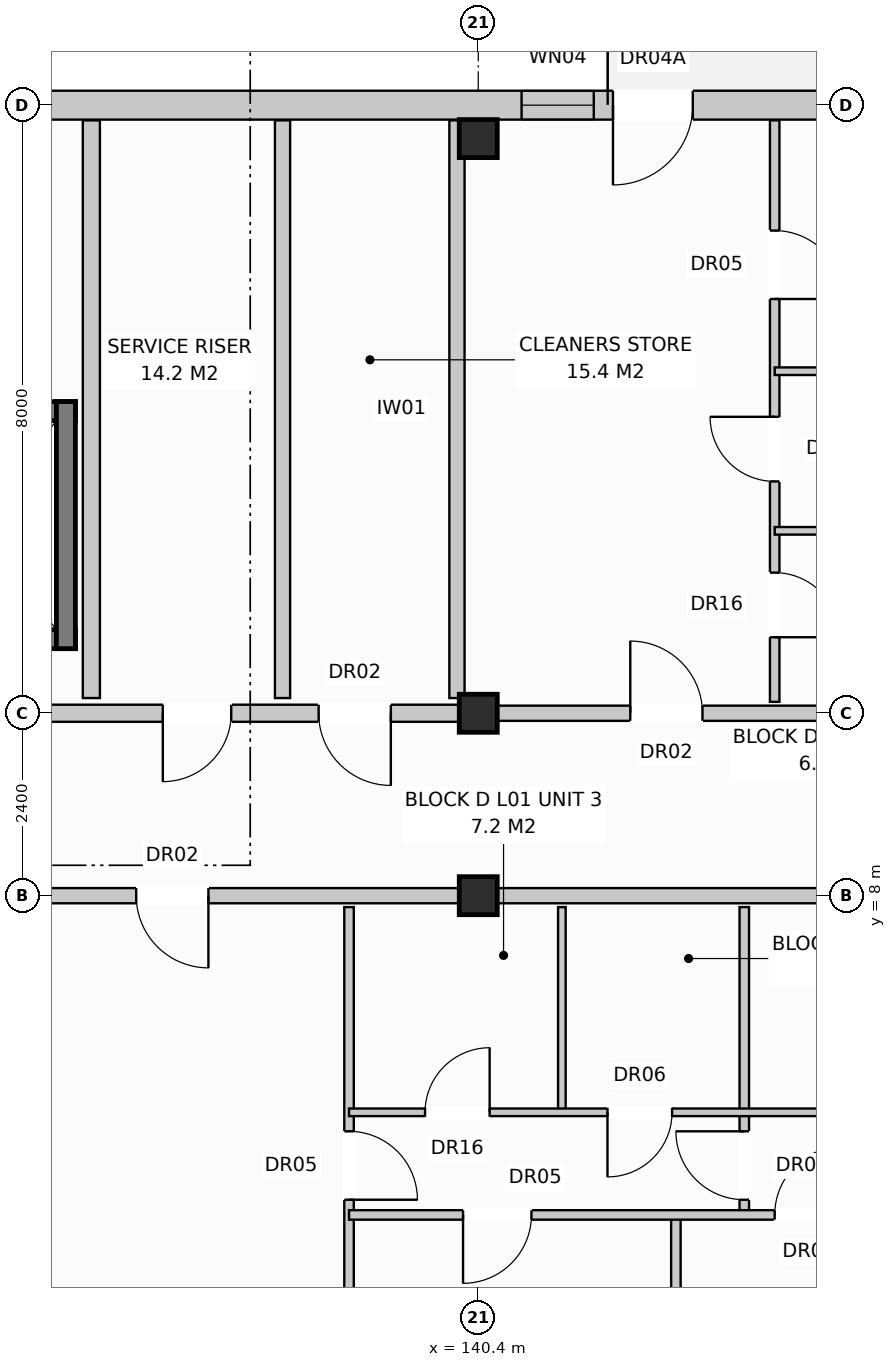
"""IFC4 building model, lengths in metres.
Left out: names, types, materials, properties, quantities, classifications, styles, units other than length and angle.
Written with IfcOpenShell. Run it as: python <this file> out.ifc"""

import sys

from ifc_helpers import new_model, si_unit, direction, frame, frame_2d, origin, origin_with_axes, origin_2d, place, context, subcontext, project, spatial, rectangle, extrude, element, fill, save


model = new_model("IFC4")
c1 = context("Model", 3, precision=1e-05, world=origin(), true_north=direction((0.0, 1.0)))
c2 = subcontext(c1, "Body", "Model", "MODEL_VIEW")
j1 = project(units=[si_unit("LENGTHUNIT", "METRE"), si_unit("PLANEANGLEUNIT", "RADIAN")], contexts=[c1])
p1 = place(None, origin())
s1 = spatial("IfcSite", under=j1, at=p1, CompositionType="ELEMENT")
p2 = place(p1, origin())
s2 = spatial("IfcBuilding", under=s1, at=p2, CompositionType="ELEMENT")
p3 = place(p2, frame((0.0, 0.0, 4.4)))
s3 = spatial("IfcBuildingStorey", under=s2, at=p3, CompositionType="ELEMENT", Elevation=4.4)
for number, where, z_axis, x_axis in (
    (1, (140.4, 8.0, 0.0), (0.0, 0.0, 1.0), (1.0, 0.0, 0.0)),
    (2, (140.4, 10.4, 0.0), (0.0, 0.0, 1.0), (1.0, 0.0, 0.0)),
    (3, (140.4, 17.96, 0.0), (0.0, 0.0, 1.0), (1.0, 0.0, 0.0)),
):
    element("IfcColumn", number, at=place(p3, frame(where, z_axis=z_axis, x_axis=x_axis)), inside=s3, PredefinedType="COLUMN", context=c2, shape_type="SweptSolid", body=[
        extrude(rectangle(XDim=0.5, YDim=0.5, at=origin_2d()), origin(), (0.0, 0.0, 1.0), 3.6),
    ])
p4 = place(p3, frame((130.25, 18.4, 0.0), z_axis=(0.0, 0.0, 1.0), x_axis=(1.0, 0.0, 0.0)))
e4 = element("IfcWall", 4, at=p4, inside=s3, PredefinedType="STANDARD", context=c2, shape_type="SweptSolid", body=[
    extrude(rectangle(XDim=17.5, YDim=0.38, at=frame_2d((8.75, 0.0))), origin(), (0.0, 0.0, 1.0), 3.33),
])
p5 = place(p4, frame((11.923, 0.0, 0.0)))
e5 = element("IfcOpeningElement", 5, at=p5, cuts=e4, PredefinedType="OPENING", context=c2, shape_type="SweptSolid", body=[
    extrude(rectangle(XDim=1.05, YDim=2.12, at=frame_2d((0.525, 1.06))), frame((0.0, 0.202, 0.0), z_axis=(0.0, -1.0, 0.0), x_axis=(1.0, 0.0, 0.0)), (0.0, 0.0, 1.0), 0.404),
])
p6 = place(p4, frame((10.72, 0.0, 0.9)))
e6 = element("IfcOpeningElement", 6, at=p6, cuts=e4, PredefinedType="OPENING", context=c2, shape_type="SweptSolid", body=[
    extrude(rectangle(XDim=0.95, YDim=1.55, at=frame_2d((0.475, 0.775))), frame((0.0, 0.202, 0.0), z_axis=(0.0, -1.0, 0.0), x_axis=(1.0, 0.0, 0.0)), (0.0, 0.0, 1.0), 0.404),
])
p7 = place(p4, frame((14.62, 0.0, 0.8)))
e7 = element("IfcOpeningElement", 7, at=p7, cuts=e4, PredefinedType="OPENING", context=c2, shape_type="SweptSolid", body=[
    extrude(rectangle(XDim=1.8, YDim=1.7, at=frame_2d((0.9, 0.85))), frame((0.0, 0.202, 0.0), z_axis=(0.0, -1.0, 0.0), x_axis=(1.0, 0.0, 0.0)), (0.0, 0.0, 1.0), 0.404),
])
p8 = place(p3, frame((132.5, 14.375, 0.0), z_axis=(0.0, 0.0, 1.0), x_axis=(1.0, 0.0, 0.0)))
e8 = element("IfcWall", 8, at=p8, inside=s3, PredefinedType="SHEAR", context=c2, shape_type="SweptSolid", body=[
    extrude(rectangle(XDim=2.6, YDim=0.25, at=frame_2d((1.3, 0.0))), origin(), (0.0, 0.0, 1.0), 3.33),
])
p9 = place(p8, frame((0.875, 0.0, 0.0)))
e9 = element("IfcOpeningElement", 9, at=p9, cuts=e8, PredefinedType="OPENING", context=c2, shape_type="SweptSolid", body=[
    extrude(rectangle(XDim=1.1, YDim=2.1, at=frame_2d((0.55, 1.05))), frame((0.0, 0.137, 0.0), z_axis=(0.0, -1.0, 0.0), x_axis=(1.0, 0.0, 0.0)), (0.0, 0.0, 1.0), 0.274),
])
p10 = place(p3, frame((132.5, 11.375, 0.0), z_axis=(0.0, 0.0, 1.0), x_axis=(1.0, 0.0, 0.0)))
e10 = element("IfcWall", 10, at=p10, inside=s3, PredefinedType="SHEAR", context=c2, shape_type="SweptSolid", body=[
    extrude(rectangle(XDim=2.6, YDim=0.25, at=frame_2d((1.3, 0.0))), origin(), (0.0, 0.0, 1.0), 3.33),
])
p11 = place(p3, frame((134.975, 11.25, 0.0), z_axis=(0.0, 0.0, 1.0), x_axis=(0.0, 1.0, 0.0)))
e11 = element("IfcWall", 11, at=p11, inside=s3, PredefinedType="SHEAR", context=c2, shape_type="SweptSolid", body=[
    extrude(rectangle(XDim=3.25, YDim=0.25, at=frame_2d((1.625, 0.0))), origin(), (0.0, 0.0, 1.0), 3.33),
])
p12 = place(p3, frame((135.31, 10.6, 0.0), z_axis=(0.0, 0.0, 1.0), x_axis=(0.0, 1.0, 0.0)))
e12 = element("IfcWall", 12, at=p12, inside=s3, PredefinedType="PARTITIONING", context=c2, shape_type="SweptSolid", body=[
    extrude(rectangle(XDim=7.6, YDim=0.225, at=frame_2d((3.8, 0.0))), origin(), (0.0, 0.0, 1.0), 2.99),
])
for number, where, z_axis, x_axis in (
    (13, (137.825, 10.6, 0.0), (0.0, 0.0, 1.0), (0.0, 1.0, 0.0)),
    (14, (140.12, 10.6, 0.0), (0.0, 0.0, 1.0), (0.0, 1.0, 0.0)),
):
    element("IfcWall", number, at=place(p3, frame(where, z_axis=z_axis, x_axis=x_axis)), inside=s3, PredefinedType="PARTITIONING", context=c2, shape_type="SweptSolid", body=[
        extrude(rectangle(XDim=7.6, YDim=0.2, at=frame_2d((3.8, 0.0))), origin(), (0.0, 0.0, 1.0), 3.33),
    ])
p13 = place(p3, frame((130.4, 10.4, 0.0), z_axis=(0.0, 0.0, 1.0), x_axis=(1.0, 0.0, 0.0)))
e15 = element("IfcWall", 15, at=p13, inside=s3, PredefinedType="PARTITIONING", context=c2, shape_type="SweptSolid", body=[
    extrude(rectangle(XDim=10.0, YDim=0.225, at=frame_2d((5.0, 0.0))), origin(), (0.0, 0.0, 1.0), 2.77),
])
p14 = place(p13, frame((0.475, 0.0, 0.0)))
e16 = element("IfcOpeningElement", 16, at=p14, cuts=e15, PredefinedType="OPENING", context=c2, shape_type="SweptSolid", body=[
    extrude(rectangle(XDim=1.1, YDim=2.15, at=frame_2d((0.55, 1.075))), frame((0.0, 0.125, 0.0), z_axis=(0.0, -1.0, 0.0), x_axis=(1.0, 0.0, 0.0)), (0.0, 0.0, 1.0), 0.249),
])
p15 = place(p13, frame((5.85, 0.0, 0.0)))
e17 = element("IfcOpeningElement", 17, at=p15, cuts=e15, PredefinedType="OPENING", context=c2, shape_type="SweptSolid", body=[
    extrude(rectangle(XDim=0.9, YDim=2.1, at=frame_2d((0.45, 1.05))), frame((0.0, 0.125, 0.0), z_axis=(0.0, -1.0, 0.0), x_axis=(1.0, 0.0, 0.0)), (0.0, 0.0, 1.0), 0.249),
])
p16 = place(p13, frame((7.9, 0.0, 0.0)))
e18 = element("IfcOpeningElement", 18, at=p16, cuts=e15, PredefinedType="OPENING", context=c2, shape_type="SweptSolid", body=[
    extrude(rectangle(XDim=0.95, YDim=2.15, at=frame_2d((0.475, 1.075))), frame((0.0, 0.125, 0.0), z_axis=(0.0, -1.0, 0.0), x_axis=(1.0, 0.0, 0.0)), (0.0, 0.0, 1.0), 0.249),
])
p17 = place(p3, frame((133.5, 8.0, 0.0), z_axis=(0.0, 0.0, 1.0), x_axis=(1.0, 0.0, 0.0)))
e19 = element("IfcWall", 19, at=p17, inside=s3, PredefinedType="PARTITIONING", context=c2, shape_type="SweptSolid", body=[
    extrude(rectangle(XDim=13.8, YDim=0.2, at=frame_2d((6.9, 0.0))), origin(), (0.0, 0.0, 1.0), 2.77),
])
p18 = place(p17, frame((2.4, 0.0, 0.0)))
e20 = element("IfcOpeningElement", 20, at=p18, cuts=e19, PredefinedType="OPENING", context=c2, shape_type="SweptSolid", body=[
    extrude(rectangle(XDim=0.95, YDim=2.15, at=frame_2d((0.475, 1.075))), frame((0.0, 0.112, 0.0), z_axis=(0.0, -1.0, 0.0), x_axis=(1.0, 0.0, 0.0)), (0.0, 0.0, 1.0), 0.224),
])
p19 = place(p3, frame((138.7, 7.85, 0.0), z_axis=(0.0, 0.0, 1.0), x_axis=(0.0, -1.0, 0.0)))
e21 = element("IfcWall", 21, at=p19, inside=s3, PredefinedType="PARTITIONING", context=c2, shape_type="SweptSolid", body=[
    extrude(rectangle(XDim=7.65, YDim=0.125, at=frame_2d((3.825, 0.0))), origin(), (0.0, 0.0, 1.0), 3.33),
])
p20 = place(p19, frame((2.95, 0.0, 0.0)))
e22 = element("IfcOpeningElement", 22, at=p20, cuts=e21, PredefinedType="OPENING", context=c2, shape_type="SweptSolid", body=[
    extrude(rectangle(XDim=0.9, YDim=2.1, at=frame_2d((0.45, 1.05))), frame((0.0, 0.074, 0.0), z_axis=(0.0, -1.0, 0.0), x_axis=(1.0, 0.0, 0.0)), (0.0, 0.0, 1.0), 0.149),
])
p21 = place(p3, frame((141.5, 7.85, 0.0), z_axis=(0.0, 0.0, 1.0), x_axis=(0.0, -1.0, 0.0)))
e23 = element("IfcWall", 23, at=p21, inside=s3, PredefinedType="PARTITIONING", context=c2, shape_type="SweptSolid", body=[
    extrude(rectangle(XDim=2.7, YDim=0.1, at=frame_2d((1.35, 0.0))), origin(), (0.0, 0.0, 1.0), 3.33),
])
p22 = place(p3, frame((143.9, 7.85, 0.0), z_axis=(0.0, 0.0, 1.0), x_axis=(0.0, -1.0, 0.0)))
e24 = element("IfcWall", 24, at=p22, inside=s3, PredefinedType="PARTITIONING", context=c2, shape_type="SweptSolid", body=[
    extrude(rectangle(XDim=4.05, YDim=0.125, at=frame_2d((2.025, 0.0))), origin(), (0.0, 0.0, 1.0), 3.33),
])
p23 = place(p22, frame((2.95, 0.0, 0.0)))
e25 = element("IfcOpeningElement", 25, at=p23, cuts=e24, PredefinedType="OPENING", context=c2, shape_type="SweptSolid", body=[
    extrude(rectangle(XDim=0.9, YDim=2.1, at=frame_2d((0.45, 1.05))), frame((0.0, 0.074, 0.0), z_axis=(0.0, -1.0, 0.0), x_axis=(1.0, 0.0, 0.0)), (0.0, 0.0, 1.0), 0.149),
])
p24 = place(p3, frame((143.0, 3.8, 0.0), z_axis=(0.0, 0.0, 1.0), x_axis=(0.0, -1.0, 0.0)))
e26 = element("IfcWall", 26, at=p24, inside=s3, PredefinedType="PARTITIONING", context=c2, shape_type="SweptSolid", body=[
    extrude(rectangle(XDim=3.6, YDim=0.125, at=frame_2d((1.8, 0.0))), origin(), (0.0, 0.0, 1.0), 2.99),
])
p25 = place(p3, frame((138.7, 5.15, 0.0), z_axis=(0.0, 0.0, 1.0), x_axis=(1.0, 0.0, 0.0)))
e27 = element("IfcWall", 27, at=p25, inside=s3, PredefinedType="PARTITIONING", context=c2, shape_type="SweptSolid", body=[
    extrude(rectangle(XDim=8.5, YDim=0.1, at=frame_2d((4.25, 0.0))), origin(), (0.0, 0.0, 1.0), 3.33),
])
p26 = place(p25, frame((1.0, 0.0, 0.0)))
e28 = element("IfcOpeningElement", 28, at=p26, cuts=e27, PredefinedType="OPENING", context=c2, shape_type="SweptSolid", body=[
    extrude(rectangle(XDim=0.85, YDim=2.1, at=frame_2d((0.425, 1.05))), frame((0.0, 0.062, 0.0), z_axis=(0.0, -1.0, 0.0), x_axis=(1.0, 0.0, 0.0)), (0.0, 0.0, 1.0), 0.124),
])
p27 = place(p25, frame((3.4, 0.0, 0.0)))
e29 = element("IfcOpeningElement", 29, at=p27, cuts=e27, PredefinedType="OPENING", context=c2, shape_type="SweptSolid", body=[
    extrude(rectangle(XDim=0.85, YDim=2.05, at=frame_2d((0.425, 1.025))), frame((0.0, 0.062, 0.0), z_axis=(0.0, -1.0, 0.0), x_axis=(1.0, 0.0, 0.0)), (0.0, 0.0, 1.0), 0.124),
])
p28 = place(p25, frame((6.2, 0.0, 0.0)))
e30 = element("IfcOpeningElement", 30, at=p28, cuts=e27, PredefinedType="OPENING", context=c2, shape_type="SweptSolid", body=[
    extrude(rectangle(XDim=0.85, YDim=2.05, at=frame_2d((0.425, 1.025))), frame((0.0, 0.062, 0.0), z_axis=(0.0, -1.0, 0.0), x_axis=(1.0, 0.0, 0.0)), (0.0, 0.0, 1.0), 0.124),
])
p29 = place(p3, frame((138.7, 3.8, 0.0), z_axis=(0.0, 0.0, 1.0), x_axis=(1.0, 0.0, 0.0)))
e31 = element("IfcWall", 31, at=p29, inside=s3, PredefinedType="PARTITIONING", context=c2, shape_type="SweptSolid", body=[
    extrude(rectangle(XDim=8.5, YDim=0.125, at=frame_2d((4.25, 0.0))), origin(), (0.0, 0.0, 1.0), 3.33),
])
p30 = place(p29, frame((1.5, 0.0, 0.0)))
e32 = element("IfcOpeningElement", 32, at=p30, cuts=e31, PredefinedType="OPENING", context=c2, shape_type="SweptSolid", body=[
    extrude(rectangle(XDim=0.9, YDim=2.1, at=frame_2d((0.45, 1.05))), frame((0.0, 0.074, 0.0), z_axis=(0.0, -1.0, 0.0), x_axis=(1.0, 0.0, 0.0)), (0.0, 0.0, 1.0), 0.149),
])
p31 = place(p29, frame((5.6, 0.0, 0.0)))
e33 = element("IfcOpeningElement", 33, at=p31, cuts=e31, PredefinedType="OPENING", context=c2, shape_type="SweptSolid", body=[
    extrude(rectangle(XDim=0.9, YDim=2.1, at=frame_2d((0.45, 1.05))), frame((0.0, 0.074, 0.0), z_axis=(0.0, -1.0, 0.0), x_axis=(1.0, 0.0, 0.0)), (0.0, 0.0, 1.0), 0.149),
])
p32 = place(p3, frame((140.4, 10.4, 0.0), z_axis=(0.0, 0.0, 1.0), x_axis=(1.0, 0.0, 0.0)))
e34 = element("IfcWall", 34, at=p32, inside=s3, PredefinedType="PARTITIONING", context=c2, shape_type="SweptSolid", body=[
    extrude(rectangle(XDim=6.9, YDim=0.2, at=frame_2d((3.45, 0.0))), origin(), (0.0, 0.0, 1.0), 2.77),
])
p33 = place(p32, frame((2.0, 0.0, 0.0)))
e35 = element("IfcOpeningElement", 35, at=p33, cuts=e34, PredefinedType="OPENING", context=c2, shape_type="SweptSolid", body=[
    extrude(rectangle(XDim=0.95, YDim=2.15, at=frame_2d((0.475, 1.075))), frame((0.0, 0.112, 0.0), z_axis=(0.0, -1.0, 0.0), x_axis=(1.0, 0.0, 0.0)), (0.0, 0.0, 1.0), 0.224),
])
p34 = place(p3, frame((144.3, 10.55, 0.0), z_axis=(0.0, 0.0, 1.0), x_axis=(0.0, 1.0, 0.0)))
e36 = element("IfcWall", 36, at=p34, inside=s3, PredefinedType="PARTITIONING", context=c2, shape_type="SweptSolid", body=[
    extrude(rectangle(XDim=7.65, YDim=0.125, at=frame_2d((3.825, 0.0))), origin(), (0.0, 0.0, 1.0), 3.33),
])
p35 = place(p34, frame((0.85, 0.0, 0.0)))
e37 = element("IfcOpeningElement", 37, at=p35, cuts=e36, PredefinedType="OPENING", context=c2, shape_type="SweptSolid", body=[
    extrude(rectangle(XDim=0.85, YDim=2.1, at=frame_2d((0.425, 1.05))), frame((0.0, 0.074, 0.0), z_axis=(0.0, -1.0, 0.0), x_axis=(1.0, 0.0, 0.0)), (0.0, 0.0, 1.0), 0.149),
])
p36 = place(p34, frame((2.9, 0.0, 0.0)))
e38 = element("IfcOpeningElement", 38, at=p36, cuts=e36, PredefinedType="OPENING", context=c2, shape_type="SweptSolid", body=[
    extrude(rectangle(XDim=0.85, YDim=2.05, at=frame_2d((0.425, 1.025))), frame((0.0, 0.074, 0.0), z_axis=(0.0, -1.0, 0.0), x_axis=(1.0, 0.0, 0.0)), (0.0, 0.0, 1.0), 0.149),
])
p37 = place(p34, frame((5.3, 0.0, 0.0)))
e39 = element("IfcOpeningElement", 39, at=p37, cuts=e36, PredefinedType="OPENING", context=c2, shape_type="SweptSolid", body=[
    extrude(rectangle(XDim=0.9, YDim=2.1, at=frame_2d((0.45, 1.05))), frame((0.0, 0.074, 0.0), z_axis=(0.0, -1.0, 0.0), x_axis=(1.0, 0.0, 0.0)), (0.0, 0.0, 1.0), 0.149),
])
for number, where, z_axis, x_axis in (
    (40, (144.3, 12.8, 0.0), (0.0, 0.0, 1.0), (1.0, 0.0, 0.0)),
    (41, (144.3, 14.9, 0.0), (0.0, 0.0, 1.0), (1.0, 0.0, 0.0)),
):
    element("IfcWall", number, at=place(p3, frame(where, z_axis=z_axis, x_axis=x_axis)), inside=s3, PredefinedType="PARTITIONING", context=c2, shape_type="SweptSolid", body=[
        extrude(rectangle(XDim=2.9, YDim=0.1, at=frame_2d((1.45, 0.0))), origin(), (0.0, 0.0, 1.0), 3.33),
    ])
p38 = place(p5, frame((1.05, 0.0, 0.0), z_axis=(0.0, 0.0, 1.0), x_axis=(-1.0, 0.0, 0.0)))
e42 = element("IfcDoor", 42, at=p38, inside=s3, OperationType="SINGLE_SWING_LEFT", PredefinedType="DOOR", context=c2, shape_type="SweptSolid", body=[
    extrude(rectangle(XDim=1.05, YDim=2.12, at=frame_2d((0.525, 1.06))), frame((0.0, 0.025, 0.0), z_axis=(0.0, -1.0, 0.0), x_axis=(1.0, 0.0, 0.0)), (0.0, 0.0, 1.0), 0.05),
])
fill(e5, e42)
p39 = place(p6, origin_with_axes())
e43 = element("IfcWindow", 43, at=p39, inside=s3, PartitioningType="SINGLE_PANEL", PredefinedType="WINDOW", context=c2, shape_type="SweptSolid", body=[
    extrude(rectangle(XDim=0.95, YDim=1.55, at=frame_2d((0.475, 0.775))), frame((0.0, 0.03, 0.0), z_axis=(0.0, -1.0, 0.0), x_axis=(1.0, 0.0, 0.0)), (0.0, 0.0, 1.0), 0.06),
])
fill(e6, e43)
p40 = place(p15, frame((0.9, 0.0, 0.0), z_axis=(0.0, 0.0, 1.0), x_axis=(-1.0, 0.0, 0.0)))
e44 = element("IfcDoor", 44, at=p40, inside=s3, OperationType="SINGLE_SWING_LEFT", PredefinedType="DOOR", context=c2, shape_type="SweptSolid", body=[
    extrude(rectangle(XDim=0.9, YDim=2.1, at=frame_2d((0.45, 1.05))), frame((0.0, 0.025, 0.0), z_axis=(0.0, -1.0, 0.0), x_axis=(1.0, 0.0, 0.0)), (0.0, 0.0, 1.0), 0.05),
])
fill(e17, e44)
p41 = place(p16, frame((0.95, 0.0, 0.0), z_axis=(0.0, 0.0, 1.0), x_axis=(-1.0, 0.0, 0.0)))
e45 = element("IfcDoor", 45, at=p41, inside=s3, OperationType="SINGLE_SWING_RIGHT", PredefinedType="DOOR", context=c2, shape_type="SweptSolid", body=[
    extrude(rectangle(XDim=0.95, YDim=2.15, at=frame_2d((0.475, 1.075))), frame((0.0, 0.025, 0.0), z_axis=(0.0, -1.0, 0.0), x_axis=(1.0, 0.0, 0.0)), (0.0, 0.0, 1.0), 0.05),
])
fill(e18, e45)
p42 = place(p18, frame((0.95, 0.0, 0.0), z_axis=(0.0, 0.0, 1.0), x_axis=(-1.0, 0.0, 0.0)))
e46 = element("IfcDoor", 46, at=p42, inside=s3, OperationType="SINGLE_SWING_RIGHT", PredefinedType="DOOR", context=c2, shape_type="SweptSolid", body=[
    extrude(rectangle(XDim=0.95, YDim=2.15, at=frame_2d((0.475, 1.075))), frame((0.0, 0.025, 0.0), z_axis=(0.0, -1.0, 0.0), x_axis=(1.0, 0.0, 0.0)), (0.0, 0.0, 1.0), 0.05),
])
fill(e20, e46)
p43 = place(p20, origin_with_axes())
e47 = element("IfcDoor", 47, at=p43, inside=s3, OperationType="SINGLE_SWING_RIGHT", PredefinedType="DOOR", context=c2, shape_type="SweptSolid", body=[
    extrude(rectangle(XDim=0.9, YDim=2.1, at=frame_2d((0.45, 1.05))), frame((0.0, 0.025, 0.0), z_axis=(0.0, -1.0, 0.0), x_axis=(1.0, 0.0, 0.0)), (0.0, 0.0, 1.0), 0.05),
])
fill(e22, e47)
p44 = place(p23, frame((0.9, 0.0, 0.0), z_axis=(0.0, 0.0, 1.0), x_axis=(-1.0, 0.0, 0.0)))
e48 = element("IfcDoor", 48, at=p44, inside=s3, OperationType="SINGLE_SWING_LEFT", PredefinedType="DOOR", context=c2, shape_type="SweptSolid", body=[
    extrude(rectangle(XDim=0.9, YDim=2.1, at=frame_2d((0.45, 1.05))), frame((0.0, 0.025, 0.0), z_axis=(0.0, -1.0, 0.0), x_axis=(1.0, 0.0, 0.0)), (0.0, 0.0, 1.0), 0.05),
])
fill(e25, e48)
p45 = place(p26, origin_with_axes())
e49 = element("IfcDoor", 49, at=p45, inside=s3, OperationType="SINGLE_SWING_RIGHT", PredefinedType="DOOR", context=c2, shape_type="SweptSolid", body=[
    extrude(rectangle(XDim=0.85, YDim=2.1, at=frame_2d((0.425, 1.05))), frame((0.0, 0.025, 0.0), z_axis=(0.0, -1.0, 0.0), x_axis=(1.0, 0.0, 0.0)), (0.0, 0.0, 1.0), 0.05),
])
fill(e28, e49)
p46 = place(p27, frame((0.85, 0.0, 0.0), z_axis=(0.0, 0.0, 1.0), x_axis=(-1.0, 0.0, 0.0)))
e50 = element("IfcDoor", 50, at=p46, inside=s3, OperationType="SINGLE_SWING_LEFT", PredefinedType="DOOR", context=c2, shape_type="SweptSolid", body=[
    extrude(rectangle(XDim=0.85, YDim=2.05, at=frame_2d((0.425, 1.025))), frame((0.0, 0.025, 0.0), z_axis=(0.0, -1.0, 0.0), x_axis=(1.0, 0.0, 0.0)), (0.0, 0.0, 1.0), 0.05),
])
fill(e29, e50)
p47 = place(p30, frame((0.9, 0.0, 0.0), z_axis=(0.0, 0.0, 1.0), x_axis=(-1.0, 0.0, 0.0)))
e51 = element("IfcDoor", 51, at=p47, inside=s3, OperationType="SINGLE_SWING_LEFT", PredefinedType="DOOR", context=c2, shape_type="SweptSolid", body=[
    extrude(rectangle(XDim=0.9, YDim=2.1, at=frame_2d((0.45, 1.05))), frame((0.0, 0.025, 0.0), z_axis=(0.0, -1.0, 0.0), x_axis=(1.0, 0.0, 0.0)), (0.0, 0.0, 1.0), 0.05),
])
fill(e32, e51)
p48 = place(p31, origin_with_axes())
e52 = element("IfcDoor", 52, at=p48, inside=s3, OperationType="SINGLE_SWING_RIGHT", PredefinedType="DOOR", context=c2, shape_type="SweptSolid", body=[
    extrude(rectangle(XDim=0.9, YDim=2.1, at=frame_2d((0.45, 1.05))), frame((0.0, 0.025, 0.0), z_axis=(0.0, -1.0, 0.0), x_axis=(1.0, 0.0, 0.0)), (0.0, 0.0, 1.0), 0.05),
])
fill(e33, e52)
p49 = place(p33, origin_with_axes())
e53 = element("IfcDoor", 53, at=p49, inside=s3, OperationType="SINGLE_SWING_LEFT", PredefinedType="DOOR", context=c2, shape_type="SweptSolid", body=[
    extrude(rectangle(XDim=0.95, YDim=2.15, at=frame_2d((0.475, 1.075))), frame((0.0, 0.025, 0.0), z_axis=(0.0, -1.0, 0.0), x_axis=(1.0, 0.0, 0.0)), (0.0, 0.0, 1.0), 0.05),
])
fill(e35, e53)
p50 = place(p35, frame((0.85, 0.0, 0.0), z_axis=(0.0, 0.0, 1.0), x_axis=(-1.0, 0.0, 0.0)))
e54 = element("IfcDoor", 54, at=p50, inside=s3, OperationType="SINGLE_SWING_LEFT", PredefinedType="DOOR", context=c2, shape_type="SweptSolid", body=[
    extrude(rectangle(XDim=0.85, YDim=2.1, at=frame_2d((0.425, 1.05))), frame((0.0, 0.025, 0.0), z_axis=(0.0, -1.0, 0.0), x_axis=(1.0, 0.0, 0.0)), (0.0, 0.0, 1.0), 0.05),
])
fill(e37, e54)
p51 = place(p36, origin_with_axes())
e55 = element("IfcDoor", 55, at=p51, inside=s3, OperationType="SINGLE_SWING_RIGHT", PredefinedType="DOOR", context=c2, shape_type="SweptSolid", body=[
    extrude(rectangle(XDim=0.85, YDim=2.05, at=frame_2d((0.425, 1.025))), frame((0.0, 0.025, 0.0), z_axis=(0.0, -1.0, 0.0), x_axis=(1.0, 0.0, 0.0)), (0.0, 0.0, 1.0), 0.05),
])
fill(e38, e55)
p52 = place(p37, frame((0.9, 0.0, 0.0), z_axis=(0.0, 0.0, 1.0), x_axis=(-1.0, 0.0, 0.0)))
e56 = element("IfcDoor", 56, at=p52, inside=s3, OperationType="SINGLE_SWING_LEFT", PredefinedType="DOOR", context=c2, shape_type="SweptSolid", body=[
    extrude(rectangle(XDim=0.9, YDim=2.1, at=frame_2d((0.45, 1.05))), frame((0.0, 0.025, 0.0), z_axis=(0.0, -1.0, 0.0), x_axis=(1.0, 0.0, 0.0)), (0.0, 0.0, 1.0), 0.05),
])
fill(e39, e56)
save(model, sys.argv[1])
